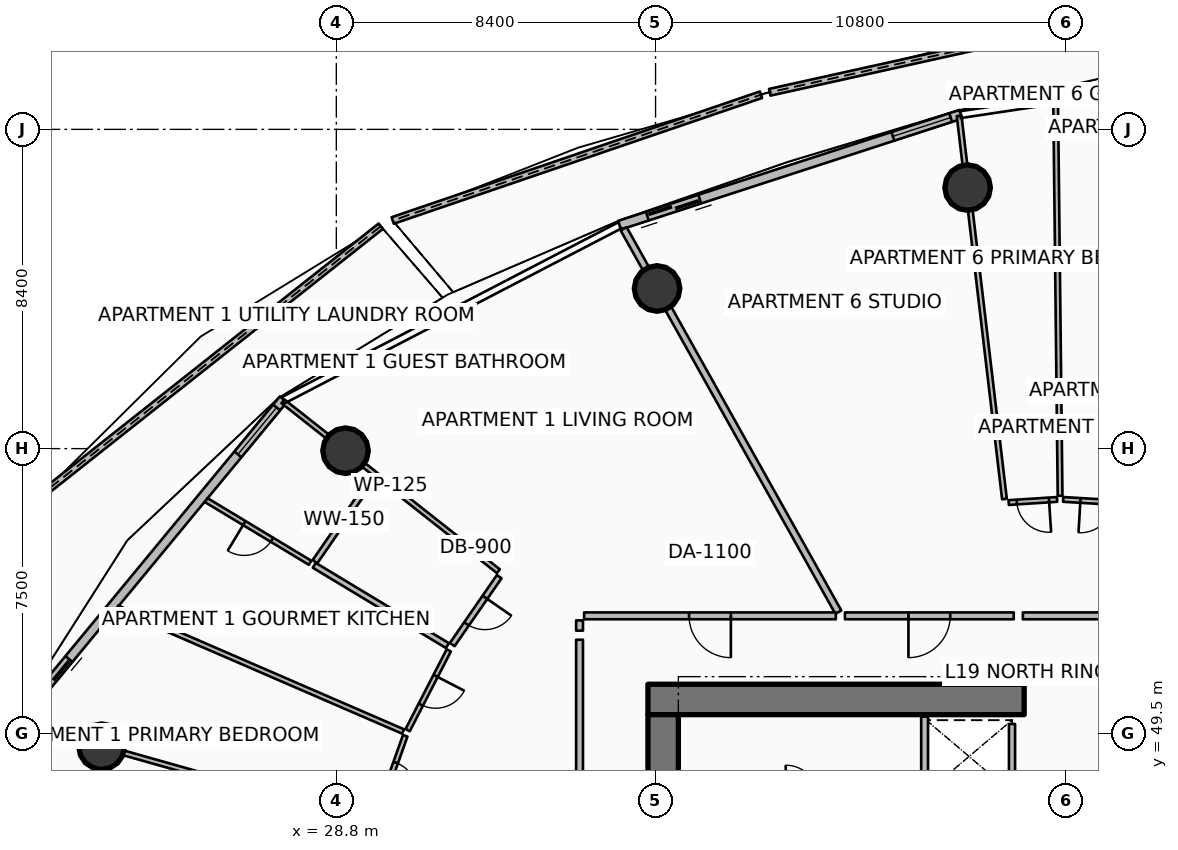
"""IFC4 building model, lengths in metres.
Left out: names, types, materials, properties, quantities, classifications, styles, units other than length and angle.
Written with IfcOpenShell. Run it as: python <this file> out.ifc"""

import sys

from ifc_helpers import new_model, si_unit, direction, frame, frame_2d, origin, origin_2d, place, context, subcontext, project, spatial, polyline, rectangle, circle, outline, extrude, element, fill, save


model = new_model("IFC4")
c1 = context("Model", 3, precision=1e-05, world=origin(), true_north=direction((0.0, 1.0)))
c2 = subcontext(c1, "Body", "Model", "MODEL_VIEW")
j1 = project(units=[si_unit("LENGTHUNIT", "METRE"), si_unit("PLANEANGLEUNIT", "RADIAN")], contexts=[c1])
p1 = place(None, origin())
s1 = spatial("IfcSite", under=j1, at=p1, CompositionType="ELEMENT")
p2 = place(p1, origin())
s2 = spatial("IfcBuilding", under=s1, at=p2, CompositionType="ELEMENT")
p3 = place(p2, frame((0.0, 0.0, 78.9)))
s3 = spatial("IfcBuildingStorey", under=s2, at=p3, CompositionType="ELEMENT", Elevation=78.9)
p4 = place(p3, frame((37.0, 50.4, 0.0), z_axis=(0.0, 0.0, 1.0), x_axis=(1.0, 0.0, 0.0)))
e1 = element("IfcWall", 1, at=p4, inside=s3, PredefinedType="SHEAR", context=c2, shape_type="SweptSolid", body=[
    extrude(rectangle(XDim=9.9, YDim=0.8, at=frame_2d((4.95, 0.0))), origin(), (0.0, 0.0, 1.0), 3.75),
])
p5 = place(p3, frame((37.4, 34.0, 0.0), z_axis=(0.0, 0.0, 1.0), x_axis=(0.0, 1.0, 0.0)))
e2 = element("IfcWall", 2, at=p5, inside=s3, PredefinedType="SHEAR", context=c2, shape_type="SweptSolid", body=[
    extrude(rectangle(XDim=16.0, YDim=0.8, at=frame_2d((8.0, 0.0))), origin(), (0.0, 0.0, 1.0), 3.75),
])
for number, where, z_axis, x_axis in (
    (3, (45.412, 63.869, 0.0), (0.0, 0.0, 1.0), (1.0, 0.0, 0.0)),
    (4, (37.24, 61.214, 0.0), (0.0, 0.0, 1.0), (1.0, 0.0, 0.0)),
    (5, (29.042, 56.945, 0.0), (0.0, 0.0, 1.0), (1.0, 0.0, 0.0)),
    (6, (22.623, 49.157, 0.0), (0.0, 0.0, 1.0), (1.0, 0.0, 0.0)),
):
    element("IfcColumn", number, at=place(p3, frame(where, z_axis=z_axis, x_axis=x_axis)), inside=s3, PredefinedType="COLUMN", context=c2, shape_type="SweptSolid", body=[
        extrude(circle(Radius=0.6, at=origin_2d()), origin(), (0.0, 0.0, 1.0), 3.5),
    ])
p6 = place(p3, frame((49.925, 68.527, 0.0), z_axis=(0.0, 0.0, 1.0), x_axis=(-0.976378265654, -0.216068235423, 0.0)))
e7 = element("IfcWall", 7, at=p6, inside=s3, PredefinedType="PARAPET", context=c2, shape_type="SweptSolid", body=[
    extrude(outline(polyline([(0.0, 0.0), (9.955, 0.0), (9.955, 1.348), (4.977, 1.182), (0.0, 1.12), (0.0, 0.0)])), frame((0.0, 0.09, 0.0), z_axis=(0.0, -1.0, 0.0), x_axis=(1.0, 0.0, 0.0)), (0.0, 0.0, 1.0), 0.18),
])
p7 = place(p3, frame((39.975, 66.311, 0.0), z_axis=(0.0, 0.0, 1.0), x_axis=(-0.94637474678, -0.323070949881, 0.0)))
e8 = element("IfcWall", 8, at=p7, inside=s3, PredefinedType="PARAPET", context=c2, shape_type="SweptSolid", body=[
    extrude(outline(polyline([(0.0, 0.0), (10.241, 0.0), (10.241, 1.747), (5.121, 1.562), (0.0, 1.348), (0.0, 0.0)])), frame((0.0, 0.09, 0.0), z_axis=(0.0, -1.0, 0.0), x_axis=(1.0, 0.0, 0.0)), (0.0, 0.0, 1.0), 0.18),
])
p8 = place(p3, frame((29.969, 62.852, 0.0), z_axis=(0.0, 0.0, 1.0), x_axis=(-0.784321358075, -0.620354743084, 0.0)))
e9 = element("IfcWall", 9, at=p8, inside=s3, PredefinedType="PARAPET", context=c2, shape_type="SweptSolid", body=[
    extrude(outline(polyline([(0.0, 0.0), (11.316, 0.0), (11.316, 1.832), (5.658, 1.853), (0.0, 1.756), (0.0, 0.0)])), frame((0.0, 0.09, 0.0), z_axis=(0.0, -1.0, 0.0), x_axis=(1.0, 0.0, 0.0)), (0.0, 0.0, 1.0), 0.18),
])
p9 = place(p3, frame((45.233, 65.797, 0.0), z_axis=(0.0, 0.0, 1.0), x_axis=(-0.951052494852, -0.30902937083, 0.0)))
e10 = element("IfcWall", 10, at=p9, inside=s3, PredefinedType="SOLIDWALL", context=c2, shape_type="SweptSolid", body=[
    extrude(rectangle(XDim=9.444, YDim=0.24, at=frame_2d((4.722, 0.0))), origin(), (0.0, 0.0, 1.0), 2.45),
])
p10 = place(p9, frame((7.224, 0.0, 0.0)))
e11 = element("IfcOpeningElement", 11, at=p10, cuts=e10, PredefinedType="OPENING", context=c2, shape_type="SweptSolid", body=[
    extrude(rectangle(XDim=1.45, YDim=2.15, at=frame_2d((0.725, 1.075))), frame((0.0, 0.13, 0.0), z_axis=(0.0, -1.0, 0.0), x_axis=(1.0, 0.0, 0.0)), (0.0, 0.0, 1.0), 0.26),
])
p11 = place(p9, frame((0.28, 0.0, 0.65)))
e12 = element("IfcOpeningElement", 12, at=p11, cuts=e10, PredefinedType="OPENING", context=c2, shape_type="SweptSolid", body=[
    extrude(rectangle(XDim=1.6, YDim=1.5, at=frame_2d((0.8, 0.75))), frame((0.0, 0.13, 0.0), z_axis=(0.0, -1.0, 0.0), x_axis=(1.0, 0.0, 0.0)), (0.0, 0.0, 1.0), 0.26),
])
p12 = place(p3, frame((27.407, 58.298, 0.0), z_axis=(0.0, 0.0, 1.0), x_axis=(-0.636704975, -0.771107498868, 0.0)))
e13 = element("IfcWall", 13, at=p12, inside=s3, PredefinedType="SOLIDWALL", context=c2, shape_type="SweptSolid", body=[
    extrude(rectangle(XDim=11.084, YDim=0.24, at=frame_2d((5.542, 0.0))), origin(), (0.0, 0.0, 1.0), 2.45),
])
p13 = place(p12, frame((8.864, 0.0, 0.0)))
e14 = element("IfcOpeningElement", 14, at=p13, cuts=e13, PredefinedType="OPENING", context=c2, shape_type="SweptSolid", body=[
    extrude(rectangle(XDim=1.45, YDim=2.15, at=frame_2d((0.725, 1.075))), frame((0.0, 0.13, 0.0), z_axis=(0.0, -1.0, 0.0), x_axis=(1.0, 0.0, 0.0)), (0.0, 0.0, 1.0), 0.26),
])
p14 = place(p12, frame((0.28, 0.0, 0.65)))
e15 = element("IfcOpeningElement", 15, at=p14, cuts=e13, PredefinedType="OPENING", context=c2, shape_type="SweptSolid", body=[
    extrude(rectangle(XDim=1.6, YDim=1.5, at=frame_2d((0.8, 0.75))), frame((0.0, 0.13, 0.0), z_axis=(0.0, -1.0, 0.0), x_axis=(1.0, 0.0, 0.0)), (0.0, 0.0, 1.0), 0.26),
])
p15 = place(p3, frame((46.58, 48.045, 0.0), z_axis=(0.0, 0.0, 1.0), x_axis=(0.0, 1.0, 0.0)))
e16 = element("IfcWall", 16, at=p15, inside=s3, PredefinedType="PARTITIONING", context=c2, shape_type="SweptSolid", body=[
    extrude(rectangle(XDim=1.71, YDim=0.16, at=frame_2d((0.855, 0.0))), origin(), (0.0, 0.0, 1.0), 3.5),
])
p16 = place(p3, frame((44.28, 47.82, 0.0), z_axis=(0.0, 0.0, 1.0), x_axis=(0.0, 1.0, 0.0)))
e17 = element("IfcWall", 17, at=p16, inside=s3, PredefinedType="PARTITIONING", context=c2, shape_type="SweptSolid", body=[
    extrude(rectangle(XDim=2.13, YDim=0.18, at=frame_2d((1.065, 0.0))), origin(), (0.0, 0.0, 1.0), 3.5),
])
p17 = place(p3, frame((42.01, 52.696, 0.0), z_axis=(0.0, 0.0, 1.0), x_axis=(-0.488628442553, 0.872491974249, 0.0)))
e18 = element("IfcWall", 18, at=p17, inside=s3, PredefinedType="PARTITIONING", context=c2, shape_type="SweptSolid", body=[
    extrude(rectangle(XDim=11.563, YDim=0.18, at=frame_2d((5.782, 0.0))), origin(), (0.0, 0.0, 1.0), 2.94),
])
p18 = place(p3, frame((41.944, 52.6, 0.0), z_axis=(0.0, 0.0, 1.0), x_axis=(-1.0, 0.0, 0.0)))
e19 = element("IfcWall", 19, at=p18, inside=s3, PredefinedType="PARTITIONING", context=c2, shape_type="SweptSolid", body=[
    extrude(rectangle(XDim=6.624, YDim=0.18, at=frame_2d((3.312, 0.0))), origin(), (0.0, 0.0, 1.0), 2.94),
])
p19 = place(p18, frame((2.762, 0.0, 0.0)))
e20 = element("IfcOpeningElement", 20, at=p19, cuts=e19, PredefinedType="OPENING", context=c2, shape_type="SweptSolid", body=[
    extrude(rectangle(XDim=1.1, YDim=2.1, at=frame_2d((0.55, 1.05))), frame((0.0, 0.1, 0.0), z_axis=(0.0, -1.0, 0.0), x_axis=(1.0, 0.0, 0.0)), (0.0, 0.0, 1.0), 0.2),
])
p20 = place(p3, frame((35.2, 52.48, 0.0), z_axis=(0.0, 0.0, 1.0), x_axis=(0.0, -1.0, 0.0)))
e21 = element("IfcWall", 21, at=p20, inside=s3, PredefinedType="PARTITIONING", context=c2, shape_type="SweptSolid", body=[
    extrude(rectangle(XDim=0.269, YDim=0.18, at=frame_2d((0.135, 0.0))), origin(), (0.0, 0.0, 1.0), 2.94),
])
p21 = place(p3, frame((35.2, 51.971, 0.0), z_axis=(0.0, 0.0, 1.0), x_axis=(0.0, -1.0, 0.0)))
e22 = element("IfcWall", 22, at=p21, inside=s3, PredefinedType="PARTITIONING", context=c2, shape_type="SweptSolid", body=[
    extrude(rectangle(XDim=6.241, YDim=0.18, at=frame_2d((3.12, 0.0))), origin(), (0.0, 0.0, 1.0), 2.94),
])
p22 = place(p3, frame((33.064, 53.774, 0.0), z_axis=(0.0, 0.0, 1.0), x_axis=(-0.785299836557, 0.61911563274, 0.0)))
e23 = element("IfcWall", 23, at=p22, inside=s3, PredefinedType="PARTITIONING", context=c2, shape_type="SweptSolid", body=[
    extrude(rectangle(XDim=7.219, YDim=0.125, at=frame_2d((3.61, 0.0))), origin(), (0.0, 0.0, 1.0), 2.94),
])
p23 = place(p3, frame((33.086, 53.63, 0.0), z_axis=(0.0, 0.0, 1.0), x_axis=(-0.568917555875, -0.822394561398, 0.0)))
e24 = element("IfcWall", 24, at=p23, inside=s3, PredefinedType="PARTITIONING", context=c2, shape_type="SweptSolid", body=[
    extrude(rectangle(XDim=2.171, YDim=0.15, at=frame_2d((1.085, 0.0))), origin(), (0.0, 0.0, 1.0), 2.94),
])
p24 = place(p23, frame((0.66, 0.0, 0.0)))
e25 = element("IfcOpeningElement", 25, at=p24, cuts=e24, PredefinedType="OPENING", context=c2, shape_type="SweptSolid", body=[
    extrude(rectangle(XDim=0.85, YDim=2.06, at=frame_2d((0.425, 1.03))), frame((0.0, 0.085, 0.0), z_axis=(0.0, -1.0, 0.0), x_axis=(1.0, 0.0, 0.0)), (0.0, 0.0, 1.0), 0.17),
])
p25 = place(p3, frame((29.772, 56.243, 0.0), z_axis=(0.0, 0.0, 1.0), x_axis=(-0.568904038121, -0.822403912569, 0.0)))
e26 = element("IfcWall", 26, at=p25, inside=s3, PredefinedType="PARTITIONING", context=c2, shape_type="SweptSolid", body=[
    extrude(rectangle(XDim=2.698, YDim=0.15, at=frame_2d((1.349, 0.0))), origin(), (0.0, 0.0, 1.0), 2.94),
])
p26 = place(p3, frame((31.722, 51.817, 0.0), z_axis=(0.0, 0.0, 1.0), x_axis=(-0.856305556185, 0.516469548422, 0.0)))
e27 = element("IfcWall", 27, at=p26, inside=s3, PredefinedType="PARTITIONING", context=c2, shape_type="SweptSolid", body=[
    extrude(rectangle(XDim=4.09, YDim=0.15, at=frame_2d((2.045, 0.0))), origin(), (0.0, 0.0, 1.0), 2.94),
])
p27 = place(p3, frame((28.109, 53.997, 0.0), z_axis=(0.0, 0.0, 1.0), x_axis=(-0.856309036054, 0.516463778761, 0.0)))
e28 = element("IfcWall", 28, at=p27, inside=s3, PredefinedType="PARTITIONING", context=c2, shape_type="SweptSolid", body=[
    extrude(rectangle(XDim=3.19, YDim=0.125, at=frame_2d((1.595, 0.0))), origin(), (0.0, 0.0, 1.0), 2.94),
])
p28 = place(p27, frame((1.17, 0.0, 0.0)))
e29 = element("IfcOpeningElement", 29, at=p28, cuts=e28, PredefinedType="OPENING", context=c2, shape_type="SweptSolid", body=[
    extrude(rectangle(XDim=0.85, YDim=2.06, at=frame_2d((0.425, 1.03))), frame((0.0, 0.073, 0.0), z_axis=(0.0, -1.0, 0.0), x_axis=(1.0, 0.0, 0.0)), (0.0, 0.0, 1.0), 0.145),
])
p29 = place(p3, frame((30.557, 49.556, 0.0), z_axis=(0.0, 0.0, 1.0), x_axis=(-0.917609944695, 0.39748206173, 0.0)))
e30 = element("IfcWall", 30, at=p29, inside=s3, PredefinedType="PARTITIONING", context=c2, shape_type="SweptSolid", body=[
    extrude(rectangle(XDim=8.197, YDim=0.125, at=frame_2d((4.099, 0.0))), origin(), (0.0, 0.0, 1.0), 2.94),
])
p30 = place(p3, frame((31.758, 51.691, 0.0), z_axis=(0.0, 0.0, 1.0), x_axis=(-0.458055610994, -0.888923538465, 0.0)))
e31 = element("IfcWall", 31, at=p30, inside=s3, PredefinedType="PARTITIONING", context=c2, shape_type="SweptSolid", body=[
    extrude(rectangle(XDim=2.362, YDim=0.125, at=frame_2d((1.181, 0.0))), origin(), (0.0, 0.0, 1.0), 2.94),
])
p31 = place(p30, frame((0.756, 0.0, 0.0)))
e32 = element("IfcOpeningElement", 32, at=p31, cuts=e31, PredefinedType="OPENING", context=c2, shape_type="SweptSolid", body=[
    extrude(rectangle(XDim=0.85, YDim=2.06, at=frame_2d((0.425, 1.03))), frame((0.0, 0.073, 0.0), z_axis=(0.0, -1.0, 0.0), x_axis=(1.0, 0.0, 0.0)), (0.0, 0.0, 1.0), 0.145),
])
p32 = place(p3, frame((30.613, 49.445, 0.0), z_axis=(0.0, 0.0, 1.0), x_axis=(-0.335316857021, -0.94210541098, 0.0)))
e33 = element("IfcWall", 33, at=p32, inside=s3, PredefinedType="PARTITIONING", context=c2, shape_type="SweptSolid", body=[
    extrude(rectangle(XDim=2.352, YDim=0.125, at=frame_2d((1.176, 0.0))), origin(), (0.0, 0.0, 1.0), 2.94),
])
p33 = place(p32, frame((0.751, 0.0, 0.0)))
e34 = element("IfcOpeningElement", 34, at=p33, cuts=e33, PredefinedType="OPENING", context=c2, shape_type="SweptSolid", body=[
    extrude(rectangle(XDim=0.85, YDim=2.06, at=frame_2d((0.425, 1.03))), frame((0.0, 0.073, 0.0), z_axis=(0.0, -1.0, 0.0), x_axis=(1.0, 0.0, 0.0)), (0.0, 0.0, 1.0), 0.145),
])
p34 = place(p3, frame((29.695, 47.163, 0.0), z_axis=(0.0, 0.0, 1.0), x_axis=(-0.962455839824, 0.271438310467, 0.0)))
e35 = element("IfcWall", 35, at=p34, inside=s3, PredefinedType="PARTITIONING", context=c2, shape_type="SweptSolid", body=[
    extrude(rectangle(XDim=9.552, YDim=0.125, at=frame_2d((4.776, 0.0))), origin(), (0.0, 0.0, 1.0), 2.94),
])
p35 = place(p3, frame((46.625, 52.6, 0.0), z_axis=(0.0, 0.0, 1.0), x_axis=(-1.0, 0.0, 0.0)))
e36 = element("IfcWall", 36, at=p35, inside=s3, PredefinedType="PARTITIONING", context=c2, shape_type="SweptSolid", body=[
    extrude(rectangle(XDim=4.442, YDim=0.18, at=frame_2d((2.221, 0.0))), origin(), (0.0, 0.0, 1.0), 2.94),
])
p36 = place(p35, frame((1.671, 0.0, 0.0)))
e37 = element("IfcOpeningElement", 37, at=p36, cuts=e36, PredefinedType="OPENING", context=c2, shape_type="SweptSolid", body=[
    extrude(rectangle(XDim=1.1, YDim=2.1, at=frame_2d((0.55, 1.05))), frame((0.0, 0.1, 0.0), z_axis=(0.0, -1.0, 0.0), x_axis=(1.0, 0.0, 0.0)), (0.0, 0.0, 1.0), 0.2),
])
p37 = place(p3, frame((50.869, 52.6, 0.0), z_axis=(0.0, 0.0, 1.0), x_axis=(-1.0, 0.0, 0.0)))
e38 = element("IfcWall", 38, at=p37, inside=s3, PredefinedType="PARTITIONING", context=c2, shape_type="SweptSolid", body=[
    extrude(rectangle(XDim=4.004, YDim=0.18, at=frame_2d((2.002, 0.0))), origin(), (0.0, 0.0, 1.0), 2.94),
])
p38 = place(p3, frame((46.382, 55.674, 0.0), z_axis=(0.0, 0.0, 1.0), x_axis=(-0.117533197276, 0.99306895407, 0.0)))
e39 = element("IfcWall", 39, at=p38, inside=s3, PredefinedType="PARTITIONING", context=c2, shape_type="SweptSolid", body=[
    extrude(rectangle(XDim=10.153, YDim=0.125, at=frame_2d((5.077, 0.0))), origin(), (0.0, 0.0, 1.0), 2.94),
])
p39 = place(p3, frame((47.845, 55.758, 0.0), z_axis=(0.0, 0.0, 1.0), x_axis=(-0.011264572172, 0.999936552694, 0.0)))
e40 = element("IfcWall", 40, at=p39, inside=s3, PredefinedType="PARTITIONING", context=c2, shape_type="SweptSolid", body=[
    extrude(rectangle(XDim=10.382, YDim=0.125, at=frame_2d((5.191, 0.0))), origin(), (0.0, 0.0, 1.0), 2.94),
])
p40 = place(p3, frame((49.682, 55.559, 0.0), z_axis=(0.0, 0.0, 1.0), x_axis=(-0.99824215698, 0.059267158097, 0.0)))
e41 = element("IfcWall", 41, at=p40, inside=s3, PredefinedType="PARTITIONING", context=c2, shape_type="SweptSolid", body=[
    extrude(rectangle(XDim=1.759, YDim=0.125, at=frame_2d((0.879, 0.0))), origin(), (0.0, 0.0, 1.0), 2.94),
])
p41 = place(p40, frame((0.455, 0.0, 0.0)))
e42 = element("IfcOpeningElement", 42, at=p41, cuts=e41, PredefinedType="OPENING", context=c2, shape_type="SweptSolid", body=[
    extrude(rectangle(XDim=0.85, YDim=2.06, at=frame_2d((0.425, 1.03))), frame((0.0, 0.073, 0.0), z_axis=(0.0, -1.0, 0.0), x_axis=(1.0, 0.0, 0.0)), (0.0, 0.0, 1.0), 0.145),
])
p42 = place(p3, frame((47.766, 55.663, 0.0), z_axis=(0.0, 0.0, 1.0), x_axis=(-0.997930857608, -0.064296216329, 0.0)))
e43 = element("IfcWall", 43, at=p42, inside=s3, PredefinedType="PARTITIONING", context=c2, shape_type="SweptSolid", body=[
    extrude(rectangle(XDim=1.276, YDim=0.125, at=frame_2d((0.638, 0.0))), origin(), (0.0, 0.0, 1.0), 2.94),
])
p43 = place(p42, frame((0.213, 0.0, 0.0)))
e44 = element("IfcOpeningElement", 44, at=p43, cuts=e43, PredefinedType="OPENING", context=c2, shape_type="SweptSolid", body=[
    extrude(rectangle(XDim=0.85, YDim=2.06, at=frame_2d((0.425, 1.03))), frame((0.0, 0.073, 0.0), z_axis=(0.0, -1.0, 0.0), x_axis=(1.0, 0.0, 0.0)), (0.0, 0.0, 1.0), 0.145),
])
p44 = place(p10, origin())
e45 = element("IfcDoor", 45, at=p44, inside=s3, OperationType="DOUBLE_DOOR_SLIDING", PredefinedType="DOOR", context=c2, shape_type="SweptSolid", body=[
    extrude(rectangle(XDim=1.45, YDim=2.15, at=frame_2d((0.725, 1.075))), frame((0.0, 0.025, 0.0), z_axis=(0.0, -1.0, 0.0), x_axis=(1.0, 0.0, 0.0)), (0.0, 0.0, 1.0), 0.05),
])
fill(e11, e45)
p45 = place(p11, origin())
e46 = element("IfcWindow", 46, at=p45, inside=s3, PartitioningType="SINGLE_PANEL", PredefinedType="WINDOW", context=c2, shape_type="SweptSolid", body=[
    extrude(rectangle(XDim=1.6, YDim=1.5, at=frame_2d((0.8, 0.75))), frame((0.0, 0.03, 0.0), z_axis=(0.0, -1.0, 0.0), x_axis=(1.0, 0.0, 0.0)), (0.0, 0.0, 1.0), 0.06),
])
fill(e12, e46)
p46 = place(p13, origin())
e47 = element("IfcDoor", 47, at=p46, inside=s3, OperationType="DOUBLE_DOOR_SLIDING", PredefinedType="DOOR", context=c2, shape_type="SweptSolid", body=[
    extrude(rectangle(XDim=1.45, YDim=2.15, at=frame_2d((0.725, 1.075))), frame((0.0, 0.025, 0.0), z_axis=(0.0, -1.0, 0.0), x_axis=(1.0, 0.0, 0.0)), (0.0, 0.0, 1.0), 0.05),
])
fill(e14, e47)
p47 = place(p14, origin())
e48 = element("IfcWindow", 48, at=p47, inside=s3, PartitioningType="SINGLE_PANEL", PredefinedType="WINDOW", context=c2, shape_type="SweptSolid", body=[
    extrude(rectangle(XDim=1.6, YDim=1.5, at=frame_2d((0.8, 0.75))), frame((0.0, 0.03, 0.0), z_axis=(0.0, -1.0, 0.0), x_axis=(1.0, 0.0, 0.0)), (0.0, 0.0, 1.0), 0.06),
])
fill(e15, e48)
p48 = place(p19, origin())
e49 = element("IfcDoor", 49, at=p48, inside=s3, OperationType="SINGLE_SWING_LEFT", PredefinedType="DOOR", context=c2, shape_type="SweptSolid", body=[
    extrude(rectangle(XDim=1.1, YDim=2.1, at=frame_2d((0.55, 1.05))), frame((0.0, 0.025, 0.0), z_axis=(0.0, -1.0, 0.0), x_axis=(1.0, 0.0, 0.0)), (0.0, 0.0, 1.0), 0.05),
])
fill(e20, e49)
p49 = place(p24, origin())
e50 = element("IfcDoor", 50, at=p49, inside=s3, OperationType="SINGLE_SWING_LEFT", PredefinedType="DOOR", context=c2, shape_type="SweptSolid", body=[
    extrude(rectangle(XDim=0.85, YDim=2.06, at=frame_2d((0.425, 1.03))), frame((0.0, 0.025, 0.0), z_axis=(0.0, -1.0, 0.0), x_axis=(1.0, 0.0, 0.0)), (0.0, 0.0, 1.0), 0.05),
])
fill(e25, e50)
p50 = place(p28, origin())
e51 = element("IfcDoor", 51, at=p50, inside=s3, OperationType="SINGLE_SWING_RIGHT", PredefinedType="DOOR", context=c2, shape_type="SweptSolid", body=[
    extrude(rectangle(XDim=0.85, YDim=2.06, at=frame_2d((0.425, 1.03))), frame((0.0, 0.025, 0.0), z_axis=(0.0, -1.0, 0.0), x_axis=(1.0, 0.0, 0.0)), (0.0, 0.0, 1.0), 0.05),
])
fill(e29, e51)
p51 = place(p31, origin())
e52 = element("IfcDoor", 52, at=p51, inside=s3, OperationType="SINGLE_SWING_LEFT", PredefinedType="DOOR", context=c2, shape_type="SweptSolid", body=[
    extrude(rectangle(XDim=0.85, YDim=2.06, at=frame_2d((0.425, 1.03))), frame((0.0, 0.025, 0.0), z_axis=(0.0, -1.0, 0.0), x_axis=(1.0, 0.0, 0.0)), (0.0, 0.0, 1.0), 0.05),
])
fill(e32, e52)
p52 = place(p33, origin())
e53 = element("IfcDoor", 53, at=p52, inside=s3, OperationType="SINGLE_SWING_RIGHT", PredefinedType="DOOR", context=c2, shape_type="SweptSolid", body=[
    extrude(rectangle(XDim=0.85, YDim=2.06, at=frame_2d((0.425, 1.03))), frame((0.0, 0.025, 0.0), z_axis=(0.0, -1.0, 0.0), x_axis=(1.0, 0.0, 0.0)), (0.0, 0.0, 1.0), 0.05),
])
fill(e34, e53)
p53 = place(p36, origin())
e54 = element("IfcDoor", 54, at=p53, inside=s3, OperationType="SINGLE_SWING_RIGHT", PredefinedType="DOOR", context=c2, shape_type="SweptSolid", body=[
    extrude(rectangle(XDim=1.1, YDim=2.1, at=frame_2d((0.55, 1.05))), frame((0.0, 0.025, 0.0), z_axis=(0.0, -1.0, 0.0), x_axis=(1.0, 0.0, 0.0)), (0.0, 0.0, 1.0), 0.05),
])
fill(e37, e54)
p54 = place(p41, origin())
e55 = element("IfcDoor", 55, at=p54, inside=s3, OperationType="SINGLE_SWING_RIGHT", PredefinedType="DOOR", context=c2, shape_type="SweptSolid", body=[
    extrude(rectangle(XDim=0.85, YDim=2.06, at=frame_2d((0.425, 1.03))), frame((0.0, 0.025, 0.0), z_axis=(0.0, -1.0, 0.0), x_axis=(1.0, 0.0, 0.0)), (0.0, 0.0, 1.0), 0.05),
])
fill(e42, e55)
p55 = place(p43, origin())
e56 = element("IfcDoor", 56, at=p55, inside=s3, OperationType="SINGLE_SWING_LEFT", PredefinedType="DOOR", context=c2, shape_type="SweptSolid", body=[
    extrude(rectangle(XDim=0.85, YDim=2.06, at=frame_2d((0.425, 1.03))), frame((0.0, 0.025, 0.0), z_axis=(0.0, -1.0, 0.0), x_axis=(1.0, 0.0, 0.0)), (0.0, 0.0, 1.0), 0.05),
])
fill(e44, e56)
save(model, sys.argv[1])
